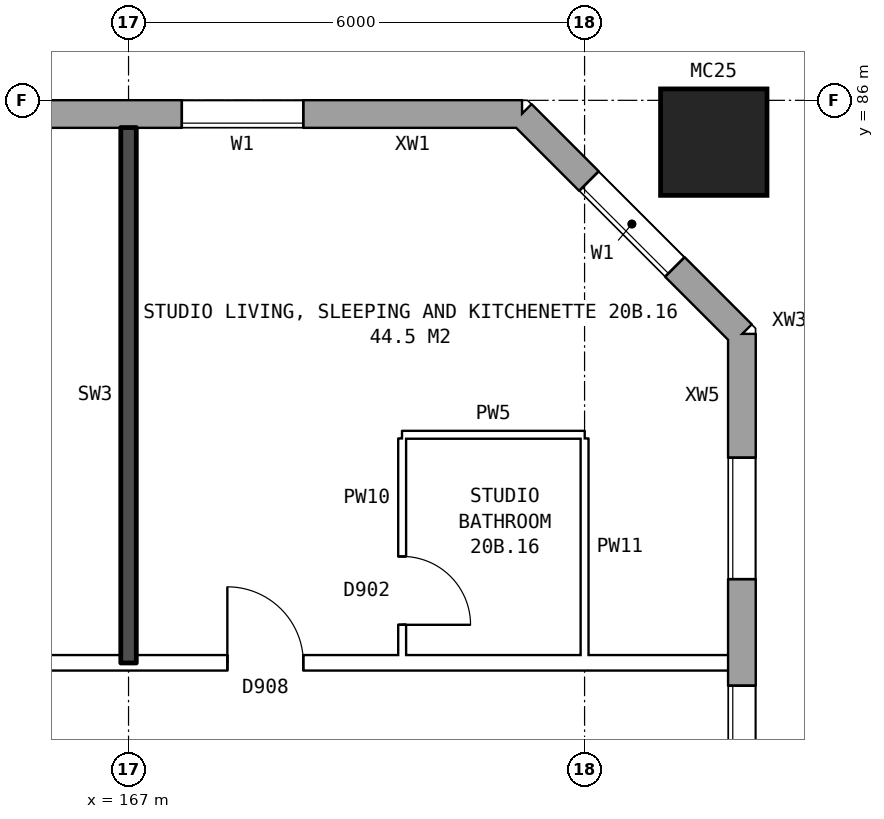
"""IFC4 building model, lengths in metres.
Left out: names, types, materials, properties, quantities, classifications, styles, units other than length and angle.
Written with IfcOpenShell. Run it as: python <this file> out.ifc"""

import sys

from ifc_helpers import new_model, si_unit, direction, frame, frame_2d, origin, origin_2d, place, context, subcontext, project, spatial, rectangle, hollow_rectangle, extrude, element, fill, save


model = new_model("IFC4")
c1 = context("Model", 3, precision=1e-05, world=origin(), true_north=direction((0.0, 1.0)))
c2 = subcontext(c1, "Body", "Model", "MODEL_VIEW")
j1 = project(units=[si_unit("LENGTHUNIT", "METRE"), si_unit("PLANEANGLEUNIT", "RADIAN")], contexts=[c1])
p1 = place(None, origin())
s1 = spatial("IfcSite", under=j1, at=p1, CompositionType="ELEMENT")
p2 = place(p1, origin())
s2 = spatial("IfcBuilding", under=s1, at=p2, CompositionType="ELEMENT")
p3 = place(p2, frame((0.0, 0.0, 74.7)))
s3 = spatial("IfcBuildingStorey", under=s2, at=p3, CompositionType="ELEMENT", Elevation=74.7)
p4 = place(p3, frame((174.7, 85.45, 0.0), z_axis=(0.0, 0.0, 1.0), x_axis=(1.0, 0.0, 0.0)))
e1 = element("IfcColumn", 1, at=p4, inside=s3, PredefinedType="COLUMN", context=c2, shape_type="SweptSolid", body=[
    extrude(hollow_rectangle(XDim=1.4, YDim=1.4, WallThickness=0.075, at=origin_2d()), origin(), (0.0, 0.0, 1.0), 3.1),
])
p5 = place(p3, frame((175.07, 57.075, 0.0), z_axis=(0.0, 0.0, 1.0), x_axis=(0.0, 1.0, 0.0)))
e2 = element("IfcWall", 2, at=p5, inside=s3, PredefinedType="STANDARD", context=c2, shape_type="SweptSolid", body=[
    extrude(rectangle(XDim=25.851, YDim=0.36, at=frame_2d((12.925, 0.0))), origin(), (0.0, 0.0, 1.0), 2.85),
])
p6 = place(p5, frame((1.625, 0.0, 0.8)))
e3 = element("IfcOpeningElement", 3, at=p6, cuts=e2, PredefinedType="OPENING", context=c2, shape_type="SweptSolid", body=[
    extrude(rectangle(XDim=1.6, YDim=1.8, at=frame_2d((0.8, 0.9))), frame((0.0, 0.19, 0.0), z_axis=(0.0, -1.0, 0.0), x_axis=(1.0, 0.0, 0.0)), (0.0, 0.0, 1.0), 0.38),
])
p7 = place(p5, frame((4.625, 0.0, 0.8)))
e4 = element("IfcOpeningElement", 4, at=p7, cuts=e2, PredefinedType="OPENING", context=c2, shape_type="SweptSolid", body=[
    extrude(rectangle(XDim=1.6, YDim=1.8, at=frame_2d((0.8, 0.9))), frame((0.0, 0.19, 0.0), z_axis=(0.0, -1.0, 0.0), x_axis=(1.0, 0.0, 0.0)), (0.0, 0.0, 1.0), 0.38),
])
p8 = place(p5, frame((6.525, 0.0, 0.8)))
e5 = element("IfcOpeningElement", 5, at=p8, cuts=e2, PredefinedType="OPENING", context=c2, shape_type="SweptSolid", body=[
    extrude(rectangle(XDim=1.2, YDim=1.8, at=frame_2d((0.6, 0.9))), frame((0.0, 0.19, 0.0), z_axis=(0.0, -1.0, 0.0), x_axis=(1.0, 0.0, 0.0)), (0.0, 0.0, 1.0), 0.38),
])
p9 = place(p5, frame((8.025, 0.0, 1.7)))
e6 = element("IfcOpeningElement", 6, at=p9, cuts=e2, PredefinedType="OPENING", context=c2, shape_type="SweptSolid", body=[
    extrude(rectangle(XDim=1.0, YDim=0.9, at=frame_2d((0.5, 0.45))), frame((0.0, 0.19, 0.0), z_axis=(0.0, -1.0, 0.0), x_axis=(1.0, 0.0, 0.0)), (0.0, 0.0, 1.0), 0.38),
])
p10 = place(p5, frame((10.125, 0.0, 0.8)))
e7 = element("IfcOpeningElement", 7, at=p10, cuts=e2, PredefinedType="OPENING", context=c2, shape_type="SweptSolid", body=[
    extrude(rectangle(XDim=0.8, YDim=0.9, at=frame_2d((0.4, 0.45))), frame((0.0, 0.19, 0.0), z_axis=(0.0, -1.0, 0.0), x_axis=(1.0, 0.0, 0.0)), (0.0, 0.0, 1.0), 0.38),
])
p11 = place(p5, frame((11.375, 0.0, 0.8)))
e8 = element("IfcOpeningElement", 8, at=p11, cuts=e2, PredefinedType="OPENING", context=c2, shape_type="SweptSolid", body=[
    extrude(rectangle(XDim=1.2, YDim=1.8, at=frame_2d((0.6, 0.9))), frame((0.0, 0.19, 0.0), z_axis=(0.0, -1.0, 0.0), x_axis=(1.0, 0.0, 0.0)), (0.0, 0.0, 1.0), 0.38),
])
p12 = place(p5, frame((19.625, 0.0, 0.8)))
e9 = element("IfcOpeningElement", 9, at=p12, cuts=e2, PredefinedType="OPENING", context=c2, shape_type="SweptSolid", body=[
    extrude(rectangle(XDim=1.6, YDim=1.8, at=frame_2d((0.8, 0.9))), frame((0.0, 0.19, 0.0), z_axis=(0.0, -1.0, 0.0), x_axis=(1.0, 0.0, 0.0)), (0.0, 0.0, 1.0), 0.38),
])
p13 = place(p5, frame((22.625, 0.0, 0.8)))
e10 = element("IfcOpeningElement", 10, at=p13, cuts=e2, PredefinedType="OPENING", context=c2, shape_type="SweptSolid", body=[
    extrude(rectangle(XDim=1.6, YDim=1.8, at=frame_2d((0.8, 0.9))), frame((0.0, 0.19, 0.0), z_axis=(0.0, -1.0, 0.0), x_axis=(1.0, 0.0, 0.0)), (0.0, 0.0, 1.0), 0.38),
])
p14 = place(p5, frame((12.875, 0.0, 0.8)))
e11 = element("IfcOpeningElement", 11, at=p14, cuts=e2, PredefinedType="OPENING", context=c2, shape_type="SweptSolid", body=[
    extrude(rectangle(XDim=1.6, YDim=1.8, at=frame_2d((0.8, 0.9))), frame((0.0, 0.19, 0.0), z_axis=(0.0, -1.0, 0.0), x_axis=(1.0, 0.0, 0.0)), (0.0, 0.0, 1.0), 0.38),
])
p15 = place(p5, frame((14.775, 0.0, 0.8)))
e12 = element("IfcOpeningElement", 12, at=p15, cuts=e2, PredefinedType="OPENING", context=c2, shape_type="SweptSolid", body=[
    extrude(rectangle(XDim=0.8, YDim=0.9, at=frame_2d((0.4, 0.45))), frame((0.0, 0.19, 0.0), z_axis=(0.0, -1.0, 0.0), x_axis=(1.0, 0.0, 0.0)), (0.0, 0.0, 1.0), 0.38),
])
p16 = place(p5, frame((16.725, 0.0, 1.7)))
e13 = element("IfcOpeningElement", 13, at=p16, cuts=e2, PredefinedType="OPENING", context=c2, shape_type="SweptSolid", body=[
    extrude(rectangle(XDim=1.0, YDim=0.9, at=frame_2d((0.5, 0.45))), frame((0.0, 0.19, 0.0), z_axis=(0.0, -1.0, 0.0), x_axis=(1.0, 0.0, 0.0)), (0.0, 0.0, 1.0), 0.38),
])
p17 = place(p5, frame((18.025, 0.0, 0.8)))
e14 = element("IfcOpeningElement", 14, at=p17, cuts=e2, PredefinedType="OPENING", context=c2, shape_type="SweptSolid", body=[
    extrude(rectangle(XDim=1.2, YDim=1.8, at=frame_2d((0.6, 0.9))), frame((0.0, 0.19, 0.0), z_axis=(0.0, -1.0, 0.0), x_axis=(1.0, 0.0, 0.0)), (0.0, 0.0, 1.0), 0.38),
])
p18 = place(p3, frame((175.07, 82.925, 0.0), z_axis=(0.0, 0.0, 1.0), x_axis=(-0.707106781187, 0.707106781187, 0.0)))
e15 = element("IfcWall", 15, at=p18, inside=s3, PredefinedType="STANDARD", context=c2, shape_type="SweptSolid", body=[
    extrude(rectangle(XDim=4.094, YDim=0.36, at=frame_2d((2.047, 0.0))), origin(), (0.0, 0.0, 1.0), 2.85),
])
p19 = place(p18, frame((1.247, 0.0, 0.8)))
e16 = element("IfcOpeningElement", 16, at=p19, cuts=e15, PredefinedType="OPENING", context=c2, shape_type="SweptSolid", body=[
    extrude(rectangle(XDim=1.6, YDim=1.8, at=frame_2d((0.8, 0.9))), frame((0.0, 0.19, 0.0), z_axis=(0.0, -1.0, 0.0), x_axis=(1.0, 0.0, 0.0)), (0.0, 0.0, 1.0), 0.38),
])
p20 = place(p3, frame((172.175, 85.82, 0.0), z_axis=(0.0, 0.0, 1.0), x_axis=(-1.0, 0.0, 0.0)))
e17 = element("IfcWall", 17, at=p20, inside=s3, PredefinedType="STANDARD", context=c2, shape_type="SweptSolid", body=[
    extrude(rectangle(XDim=38.101, YDim=0.36, at=frame_2d((19.05, 0.0))), origin(), (0.0, 0.0, 1.0), 2.85),
])
p21 = place(p20, frame((2.875, 0.0, 0.8)))
e18 = element("IfcOpeningElement", 18, at=p21, cuts=e17, PredefinedType="OPENING", context=c2, shape_type="SweptSolid", body=[
    extrude(rectangle(XDim=1.6, YDim=1.8, at=frame_2d((0.8, 0.9))), frame((0.0, 0.19, 0.0), z_axis=(0.0, -1.0, 0.0), x_axis=(1.0, 0.0, 0.0)), (0.0, 0.0, 1.0), 0.38),
])
p22 = place(p20, frame((6.525, 0.0, 0.8)))
e19 = element("IfcOpeningElement", 19, at=p22, cuts=e17, PredefinedType="OPENING", context=c2, shape_type="SweptSolid", body=[
    extrude(rectangle(XDim=0.6, YDim=0.9, at=frame_2d((0.3, 0.45))), frame((0.0, 0.19, 0.0), z_axis=(0.0, -1.0, 0.0), x_axis=(1.0, 0.0, 0.0)), (0.0, 0.0, 1.0), 0.38),
])
p23 = place(p20, frame((8.875, 0.0, 0.8)))
e20 = element("IfcOpeningElement", 20, at=p23, cuts=e17, PredefinedType="OPENING", context=c2, shape_type="SweptSolid", body=[
    extrude(rectangle(XDim=1.6, YDim=1.8, at=frame_2d((0.8, 0.9))), frame((0.0, 0.19, 0.0), z_axis=(0.0, -1.0, 0.0), x_axis=(1.0, 0.0, 0.0)), (0.0, 0.0, 1.0), 0.38),
])
p24 = place(p20, frame((11.875, 0.0, 0.8)))
e21 = element("IfcOpeningElement", 21, at=p24, cuts=e17, PredefinedType="OPENING", context=c2, shape_type="SweptSolid", body=[
    extrude(rectangle(XDim=1.6, YDim=1.8, at=frame_2d((0.8, 0.9))), frame((0.0, 0.19, 0.0), z_axis=(0.0, -1.0, 0.0), x_axis=(1.0, 0.0, 0.0)), (0.0, 0.0, 1.0), 0.38),
])
p25 = place(p20, frame((14.875, 0.0, 0.8)))
e22 = element("IfcOpeningElement", 22, at=p25, cuts=e17, PredefinedType="OPENING", context=c2, shape_type="SweptSolid", body=[
    extrude(rectangle(XDim=1.6, YDim=1.8, at=frame_2d((0.8, 0.9))), frame((0.0, 0.19, 0.0), z_axis=(0.0, -1.0, 0.0), x_axis=(1.0, 0.0, 0.0)), (0.0, 0.0, 1.0), 0.38),
])
p26 = place(p20, frame((17.875, 0.0, 0.8)))
e23 = element("IfcOpeningElement", 23, at=p26, cuts=e17, PredefinedType="OPENING", context=c2, shape_type="SweptSolid", body=[
    extrude(rectangle(XDim=1.6, YDim=1.8, at=frame_2d((0.8, 0.9))), frame((0.0, 0.19, 0.0), z_axis=(0.0, -1.0, 0.0), x_axis=(1.0, 0.0, 0.0)), (0.0, 0.0, 1.0), 0.38),
])
p27 = place(p20, frame((20.875, 0.0, 0.8)))
e24 = element("IfcOpeningElement", 24, at=p27, cuts=e17, PredefinedType="OPENING", context=c2, shape_type="SweptSolid", body=[
    extrude(rectangle(XDim=1.6, YDim=1.8, at=frame_2d((0.8, 0.9))), frame((0.0, 0.19, 0.0), z_axis=(0.0, -1.0, 0.0), x_axis=(1.0, 0.0, 0.0)), (0.0, 0.0, 1.0), 0.38),
])
p28 = place(p20, frame((23.875, 0.0, 0.8)))
e25 = element("IfcOpeningElement", 25, at=p28, cuts=e17, PredefinedType="OPENING", context=c2, shape_type="SweptSolid", body=[
    extrude(rectangle(XDim=1.6, YDim=1.8, at=frame_2d((0.8, 0.9))), frame((0.0, 0.19, 0.0), z_axis=(0.0, -1.0, 0.0), x_axis=(1.0, 0.0, 0.0)), (0.0, 0.0, 1.0), 0.38),
])
p29 = place(p20, frame((26.875, 0.0, 0.8)))
e26 = element("IfcOpeningElement", 26, at=p29, cuts=e17, PredefinedType="OPENING", context=c2, shape_type="SweptSolid", body=[
    extrude(rectangle(XDim=1.6, YDim=1.8, at=frame_2d((0.8, 0.9))), frame((0.0, 0.19, 0.0), z_axis=(0.0, -1.0, 0.0), x_axis=(1.0, 0.0, 0.0)), (0.0, 0.0, 1.0), 0.38),
])
p30 = place(p20, frame((29.375, 0.0, 0.8)))
e27 = element("IfcOpeningElement", 27, at=p30, cuts=e17, PredefinedType="OPENING", context=c2, shape_type="SweptSolid", body=[
    extrude(rectangle(XDim=1.2, YDim=1.8, at=frame_2d((0.6, 0.9))), frame((0.0, 0.19, 0.0), z_axis=(0.0, -1.0, 0.0), x_axis=(1.0, 0.0, 0.0)), (0.0, 0.0, 1.0), 0.38),
])
p31 = place(p20, frame((30.875, 0.0, 0.8)))
e28 = element("IfcOpeningElement", 28, at=p31, cuts=e17, PredefinedType="OPENING", context=c2, shape_type="SweptSolid", body=[
    extrude(rectangle(XDim=0.6, YDim=0.9, at=frame_2d((0.3, 0.45))), frame((0.0, 0.19, 0.0), z_axis=(0.0, -1.0, 0.0), x_axis=(1.0, 0.0, 0.0)), (0.0, 0.0, 1.0), 0.38),
])
p32 = place(p20, frame((35.875, 0.0, 0.8)))
e29 = element("IfcOpeningElement", 29, at=p32, cuts=e17, PredefinedType="OPENING", context=c2, shape_type="SweptSolid", body=[
    extrude(rectangle(XDim=1.6, YDim=1.8, at=frame_2d((0.8, 0.9))), frame((0.0, 0.19, 0.0), z_axis=(0.0, -1.0, 0.0), x_axis=(1.0, 0.0, 0.0)), (0.0, 0.0, 1.0), 0.38),
])
p33 = place(p20, frame((7.425, 0.0, 0.8)))
e30 = element("IfcOpeningElement", 30, at=p33, cuts=e17, PredefinedType="OPENING", context=c2, shape_type="SweptSolid", body=[
    extrude(rectangle(XDim=1.0, YDim=1.8, at=frame_2d((0.5, 0.9))), frame((0.0, 0.19, 0.0), z_axis=(0.0, -1.0, 0.0), x_axis=(1.0, 0.0, 0.0)), (0.0, 0.0, 1.0), 0.38),
])
p34 = place(p20, frame((32.725, 0.0, 1.7)))
e31 = element("IfcOpeningElement", 31, at=p34, cuts=e17, PredefinedType="OPENING", context=c2, shape_type="SweptSolid", body=[
    extrude(rectangle(XDim=0.6, YDim=0.9, at=frame_2d((0.3, 0.45))), frame((0.0, 0.19, 0.0), z_axis=(0.0, -1.0, 0.0), x_axis=(1.0, 0.0, 0.0)), (0.0, 0.0, 1.0), 0.38),
])
p35 = place(p20, frame((33.625, 0.0, 0.8)))
e32 = element("IfcOpeningElement", 32, at=p35, cuts=e17, PredefinedType="OPENING", context=c2, shape_type="SweptSolid", body=[
    extrude(rectangle(XDim=1.2, YDim=1.8, at=frame_2d((0.6, 0.9))), frame((0.0, 0.19, 0.0), z_axis=(0.0, -1.0, 0.0), x_axis=(1.0, 0.0, 0.0)), (0.0, 0.0, 1.0), 0.38),
])
p36 = place(p3, frame((155.1, 78.6, 0.0), z_axis=(0.0, 0.0, 1.0), x_axis=(1.0, 0.0, 0.0)))
e33 = element("IfcWall", 33, at=p36, inside=s3, PredefinedType="PARTITIONING", context=c2, shape_type="SweptSolid", body=[
    extrude(rectangle(XDim=19.79, YDim=0.2, at=frame_2d((9.895, 0.0))), origin(), (0.0, 0.0, 1.0), 2.85),
])
p37 = place(p36, frame((1.45, 0.0, 0.0)))
e34 = element("IfcOpeningElement", 34, at=p37, cuts=e33, PredefinedType="OPENING", context=c2, shape_type="SweptSolid", body=[
    extrude(rectangle(XDim=1.0, YDim=2.1, at=frame_2d((0.5, 1.05))), frame((0.0, 0.11, 0.0), z_axis=(0.0, -1.0, 0.0), x_axis=(1.0, 0.0, 0.0)), (0.0, 0.0, 1.0), 0.22),
])
p38 = place(p36, frame((9.6, 0.0, 0.0)))
e35 = element("IfcOpeningElement", 35, at=p38, cuts=e33, PredefinedType="OPENING", context=c2, shape_type="SweptSolid", body=[
    extrude(rectangle(XDim=1.0, YDim=2.1, at=frame_2d((0.5, 1.05))), frame((0.0, 0.11, 0.0), z_axis=(0.0, -1.0, 0.0), x_axis=(1.0, 0.0, 0.0)), (0.0, 0.0, 1.0), 0.22),
])
p39 = place(p36, frame((13.2, 0.0, 0.0)))
e36 = element("IfcOpeningElement", 36, at=p39, cuts=e33, PredefinedType="OPENING", context=c2, shape_type="SweptSolid", body=[
    extrude(rectangle(XDim=1.0, YDim=2.1, at=frame_2d((0.5, 1.05))), frame((0.0, 0.11, 0.0), z_axis=(0.0, -1.0, 0.0), x_axis=(1.0, 0.0, 0.0)), (0.0, 0.0, 1.0), 0.22),
])
p40 = place(p3, frame((170.6, 81.6, 0.0), z_axis=(0.0, 0.0, 1.0), x_axis=(1.0, 0.0, 0.0)))
e37 = element("IfcWall", 37, at=p40, inside=s3, PredefinedType="PARTITIONING", context=c2, shape_type="SweptSolid", body=[
    extrude(rectangle(XDim=2.4, YDim=0.1, at=frame_2d((1.2, 0.0))), origin(), (0.0, 0.0, 1.0), 2.85),
])
p41 = place(p3, frame((167.0, 78.6, 0.0), z_axis=(0.0, 0.0, 1.0), x_axis=(0.0, 1.0, 0.0)))
e38 = element("IfcWall", 38, at=p41, inside=s3, PredefinedType="SOLIDWALL", context=c2, shape_type="SweptSolid", body=[
    extrude(rectangle(XDim=7.04, YDim=0.2, at=frame_2d((3.52, 0.0))), origin(), (0.0, 0.0, 1.0), 2.85),
])
p42 = place(p3, frame((170.6, 78.7, 0.0), z_axis=(0.0, 0.0, 1.0), x_axis=(0.0, 1.0, 0.0)))
e39 = element("IfcWall", 39, at=p42, inside=s3, PredefinedType="PARTITIONING", context=c2, shape_type="SweptSolid", body=[
    extrude(rectangle(XDim=2.85, YDim=0.1, at=frame_2d((1.425, 0.0))), origin(), (0.0, 0.0, 1.0), 2.85),
])
p43 = place(p42, frame((0.4, 0.0, 0.0)))
e40 = element("IfcOpeningElement", 40, at=p43, cuts=e39, PredefinedType="OPENING", context=c2, shape_type="SweptSolid", body=[
    extrude(rectangle(XDim=0.9, YDim=2.1, at=frame_2d((0.45, 1.05))), frame((0.0, 0.06, 0.0), z_axis=(0.0, -1.0, 0.0), x_axis=(1.0, 0.0, 0.0)), (0.0, 0.0, 1.0), 0.12),
])
p44 = place(p3, frame((173.0, 78.7, 0.0), z_axis=(0.0, 0.0, 1.0), x_axis=(0.0, 1.0, 0.0)))
e41 = element("IfcWall", 41, at=p44, inside=s3, PredefinedType="PARTITIONING", context=c2, shape_type="SweptSolid", body=[
    extrude(rectangle(XDim=2.85, YDim=0.1, at=frame_2d((1.425, 0.0))), origin(), (0.0, 0.0, 1.0), 2.85),
])
p45 = place(p12, origin())
e42 = element("IfcWindow", 42, at=p45, inside=s3, PartitioningType="SINGLE_PANEL", PredefinedType="WINDOW", context=c2, shape_type="SweptSolid", body=[
    extrude(rectangle(XDim=1.6, YDim=1.8, at=frame_2d((0.8, 0.9))), frame((0.0, 0.15, 0.0), z_axis=(0.0, -1.0, 0.0), x_axis=(1.0, 0.0, 0.0)), (0.0, 0.0, 1.0), 0.06),
])
fill(e9, e42)
p46 = place(p13, origin())
e43 = element("IfcWindow", 43, at=p46, inside=s3, PartitioningType="SINGLE_PANEL", PredefinedType="WINDOW", context=c2, shape_type="SweptSolid", body=[
    extrude(rectangle(XDim=1.6, YDim=1.8, at=frame_2d((0.8, 0.9))), frame((0.0, 0.15, 0.0), z_axis=(0.0, -1.0, 0.0), x_axis=(1.0, 0.0, 0.0)), (0.0, 0.0, 1.0), 0.06),
])
fill(e10, e43)
p47 = place(p19, origin())
e44 = element("IfcWindow", 44, at=p47, inside=s3, PartitioningType="SINGLE_PANEL", PredefinedType="WINDOW", context=c2, shape_type="SweptSolid", body=[
    extrude(rectangle(XDim=1.6, YDim=1.8, at=frame_2d((0.8, 0.9))), frame((0.0, 0.15, 0.0), z_axis=(0.0, -1.0, 0.0), x_axis=(1.0, 0.0, 0.0)), (0.0, 0.0, 1.0), 0.06),
])
fill(e16, e44)
p48 = place(p21, origin())
e45 = element("IfcWindow", 45, at=p48, inside=s3, PartitioningType="SINGLE_PANEL", PredefinedType="WINDOW", context=c2, shape_type="SweptSolid", body=[
    extrude(rectangle(XDim=1.6, YDim=1.8, at=frame_2d((0.8, 0.9))), frame((0.0, 0.15, 0.0), z_axis=(0.0, -1.0, 0.0), x_axis=(1.0, 0.0, 0.0)), (0.0, 0.0, 1.0), 0.06),
])
fill(e18, e45)
p49 = place(p39, origin())
e46 = element("IfcDoor", 46, at=p49, inside=s3, OperationType="SINGLE_SWING_LEFT", PredefinedType="DOOR", context=c2, shape_type="SweptSolid", body=[
    extrude(rectangle(XDim=1.0, YDim=2.1, at=frame_2d((0.5, 1.05))), frame((0.0, 0.025, 0.0), z_axis=(0.0, -1.0, 0.0), x_axis=(1.0, 0.0, 0.0)), (0.0, 0.0, 1.0), 0.05),
])
fill(e36, e46)
p50 = place(p43, frame((0.9, 0.0, 0.0), z_axis=(0.0, 0.0, 1.0), x_axis=(-1.0, 0.0, 0.0)))
e47 = element("IfcDoor", 47, at=p50, inside=s3, OperationType="SINGLE_SWING_RIGHT", PredefinedType="DOOR", context=c2, shape_type="SweptSolid", body=[
    extrude(rectangle(XDim=0.9, YDim=2.1, at=frame_2d((0.45, 1.05))), frame((0.0, 0.025, 0.0), z_axis=(0.0, -1.0, 0.0), x_axis=(1.0, 0.0, 0.0)), (0.0, 0.0, 1.0), 0.05),
])
fill(e40, e47)
save(model, sys.argv[1])
